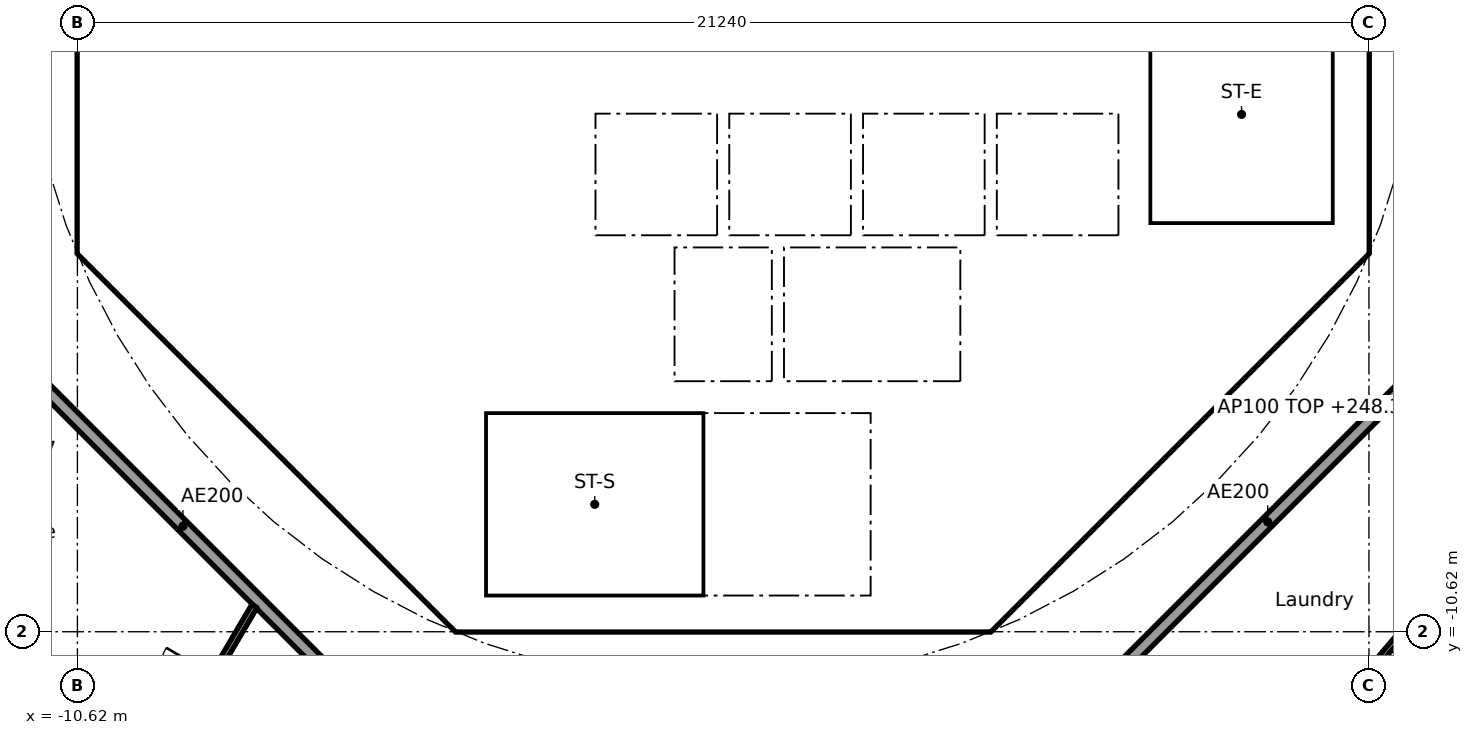
"""IFC4 building model, lengths in metres.
Left out: names, types, materials, properties, quantities, classifications, styles, units other than length and angle.
Written with IfcOpenShell. Run it as: python <this file> out.ifc"""

import sys

from ifc_helpers import new_model, si_unit, direction, frame, frame_2d, origin, place, context, subcontext, project, spatial, polyline, rectangle, outline, extrude, element, fill, save


model = new_model("IFC4")
c1 = context("Model", 3, precision=1e-05, world=origin(), true_north=direction((0.0, 1.0)))
c2 = subcontext(c1, "Body", "Model", "MODEL_VIEW")
j1 = project(units=[si_unit("LENGTHUNIT", "METRE"), si_unit("PLANEANGLEUNIT", "RADIAN")], contexts=[c1])
p1 = place(None, origin())
s1 = spatial("IfcSite", under=j1, at=p1, CompositionType="ELEMENT")
p2 = place(p1, origin())
s2 = spatial("IfcBuilding", under=s1, at=p2, CompositionType="ELEMENT")
p3 = place(p2, frame((0.0, 0.0, 245.5)))
s3 = spatial("IfcBuildingStorey", under=s2, at=p3, CompositionType="ELEMENT", Elevation=245.5)
p4 = place(p3, frame((-10.325, 3.801, 0.0), z_axis=(0.0, 0.0, 1.0), x_axis=(0.0, -1.0, 0.0)))
e1 = element("IfcWall", 1, at=p4, inside=s3, PredefinedType="SHEAR", context=c2, shape_type="SweptSolid", body=[
    extrude(rectangle(XDim=7.602, YDim=0.6, at=frame_2d((3.801, 0.0))), origin(), (0.0, 0.0, 1.0), 3.44),
])
p5 = place(p4, frame((0.651, 0.0, 0.0)))
e2 = element("IfcOpeningElement", 2, at=p5, cuts=e1, PredefinedType="OPENING", context=c2, shape_type="SweptSolid", body=[
    extrude(rectangle(XDim=1.5, YDim=2.1, at=frame_2d((0.75, 1.05))), frame((0.0, 0.31, 0.0), z_axis=(0.0, -1.0, 0.0), x_axis=(1.0, 0.0, 0.0)), (0.0, 0.0, 1.0), 0.62),
])
p6 = place(p4, frame((5.451, 0.0, 0.0)))
e3 = element("IfcOpeningElement", 3, at=p6, cuts=e1, PredefinedType="OPENING", context=c2, shape_type="SweptSolid", body=[
    extrude(rectangle(XDim=1.5, YDim=2.1, at=frame_2d((0.75, 1.05))), frame((0.0, 0.31, 0.0), z_axis=(0.0, -1.0, 0.0), x_axis=(1.0, 0.0, 0.0)), (0.0, 0.0, 1.0), 0.62),
])
p7 = place(p3, frame((-9.988, -4.613, 0.0), z_axis=(0.0, 0.0, 1.0), x_axis=(0.707106781187, -0.707106781187, 0.0)))
e4 = element("IfcWall", 4, at=p7, inside=s3, PredefinedType="SHEAR", context=c2, shape_type="SweptSolid", body=[
    extrude(rectangle(XDim=7.602, YDim=0.6, at=frame_2d((3.801, 0.0))), origin(), (0.0, 0.0, 1.0), 3.44),
])
p8 = place(p7, frame((6.151, 0.0, 0.0)))
e5 = element("IfcOpeningElement", 5, at=p8, cuts=e4, PredefinedType="OPENING", context=c2, shape_type="SweptSolid", body=[
    extrude(rectangle(XDim=1.1, YDim=2.1, at=frame_2d((0.55, 1.05))), frame((0.0, 0.31, 0.0), z_axis=(0.0, -1.0, 0.0), x_axis=(1.0, 0.0, 0.0)), (0.0, 0.0, 1.0), 0.62),
])
p9 = place(p3, frame((4.613, -9.988, 0.0), z_axis=(0.0, 0.0, 1.0), x_axis=(0.707106781187, 0.707106781187, 0.0)))
e6 = element("IfcWall", 6, at=p9, inside=s3, PredefinedType="SHEAR", context=c2, shape_type="SweptSolid", body=[
    extrude(rectangle(XDim=7.602, YDim=0.6, at=frame_2d((3.801, 0.0))), origin(), (0.0, 0.0, 1.0), 3.44),
])
p10 = place(p9, frame((3.201, 0.0, 0.0)))
e7 = element("IfcOpeningElement", 7, at=p10, cuts=e6, PredefinedType="OPENING", context=c2, shape_type="SweptSolid", body=[
    extrude(rectangle(XDim=1.2, YDim=2.1, at=frame_2d((0.6, 1.05))), frame((0.0, 0.31, 0.0), z_axis=(0.0, -1.0, 0.0), x_axis=(1.0, 0.0, 0.0)), (0.0, 0.0, 1.0), 0.62),
])
p11 = place(p3, frame((4.0, -10.025, 0.0), z_axis=(0.0, 0.0, 1.0), x_axis=(0.0, 1.0, 0.0)))
e8 = element("IfcWall", 8, at=p11, inside=s3, PredefinedType="SOLIDWALL", context=c2, shape_type="SweptSolid", body=[
    extrude(rectangle(XDim=3.0, YDim=0.2, at=frame_2d((1.5, 0.0))), origin(), (0.0, 0.0, 1.0), 3.44),
])
p12 = place(p11, frame((0.975, 0.0, 0.0)))
e9 = element("IfcOpeningElement", 9, at=p12, cuts=e8, PredefinedType="OPENING", context=c2, shape_type="SweptSolid", body=[
    extrude(rectangle(XDim=1.1, YDim=2.1, at=frame_2d((0.55, 1.05))), frame((0.0, 0.11, 0.0), z_axis=(0.0, -1.0, 0.0), x_axis=(1.0, 0.0, 0.0)), (0.0, 0.0, 1.0), 0.22),
])
p13 = place(p3, frame((-5.8, -8.227, 0.0), z_axis=(0.0, 0.0, 1.0), x_axis=(0.0, 1.0, 0.0)))
e10 = element("IfcWall", 10, at=p13, inside=s3, PredefinedType="PARTITIONING", context=c2, shape_type="SweptSolid", body=[
    extrude(rectangle(XDim=3.927, YDim=0.15, at=frame_2d((1.963, 0.0))), origin(), (0.0, 0.0, 1.0), 3.44),
])
p14 = place(p13, frame((2.615, 0.0, 0.0)))
e11 = element("IfcOpeningElement", 11, at=p14, cuts=e10, PredefinedType="OPENING", context=c2, shape_type="SweptSolid", body=[
    extrude(rectangle(XDim=0.9, YDim=2.1, at=frame_2d((0.45, 1.05))), frame((0.0, 0.085, 0.0), z_axis=(0.0, -1.0, 0.0), x_axis=(1.0, 0.0, 0.0)), (0.0, 0.0, 1.0), 0.17),
])
p15 = place(p13, frame((0.539, 0.0, 0.0)))
e12 = element("IfcOpeningElement", 12, at=p15, cuts=e10, PredefinedType="OPENING", context=c2, shape_type="SweptSolid", body=[
    extrude(rectangle(XDim=0.9, YDim=2.1, at=frame_2d((0.45, 1.05))), frame((0.0, 0.085, 0.0), z_axis=(0.0, -1.0, 0.0), x_axis=(1.0, 0.0, 0.0)), (0.0, 0.0, 1.0), 0.17),
])
p16 = place(p3, frame((4.0, -6.5, 0.0), z_axis=(0.0, 0.0, 1.0), x_axis=(0.0, 1.0, 0.0)))
e13 = element("IfcWall", 13, at=p16, inside=s3, PredefinedType="SOLIDWALL", context=c2, shape_type="SweptSolid", body=[
    extrude(rectangle(XDim=2.2, YDim=0.2, at=frame_2d((1.1, 0.0))), origin(), (0.0, 0.0, 1.0), 3.44),
])
p17 = place(p16, frame((0.55, 0.0, 0.0)))
e14 = element("IfcOpeningElement", 14, at=p17, cuts=e13, PredefinedType="OPENING", context=c2, shape_type="SweptSolid", body=[
    extrude(rectangle(XDim=1.1, YDim=2.1, at=frame_2d((0.55, 1.05))), frame((0.0, 0.11, 0.0), z_axis=(0.0, -1.0, 0.0), x_axis=(1.0, 0.0, 0.0)), (0.0, 0.0, 1.0), 0.22),
])
p18 = place(p3, frame((-4.0, -6.5, 0.0), z_axis=(0.0, 0.0, 1.0), x_axis=(0.0, 1.0, 0.0)))
e15 = element("IfcWall", 15, at=p18, inside=s3, PredefinedType="SOLIDWALL", context=c2, shape_type="SweptSolid", body=[
    extrude(rectangle(XDim=2.2, YDim=0.2, at=frame_2d((1.1, 0.0))), origin(), (0.0, 0.0, 1.0), 3.44),
])
p19 = place(p18, frame((0.65, 0.0, 0.0)))
e16 = element("IfcOpeningElement", 16, at=p19, cuts=e15, PredefinedType="OPENING", context=c2, shape_type="SweptSolid", body=[
    extrude(rectangle(XDim=0.9, YDim=2.1, at=frame_2d((0.45, 1.05))), frame((0.0, 0.11, 0.0), z_axis=(0.0, -1.0, 0.0), x_axis=(1.0, 0.0, 0.0)), (0.0, 0.0, 1.0), 0.22),
])
p20 = place(p3, frame((-6.7, -2.0, 0.0), z_axis=(0.0, 0.0, 1.0), x_axis=(1.0, 0.0, 0.0)))
e17 = element("IfcWall", 17, at=p20, inside=s3, PredefinedType="SOLIDWALL", context=c2, shape_type="SweptSolid", body=[
    extrude(rectangle(XDim=13.4, YDim=0.2, at=frame_2d((6.7, 0.0))), origin(), (0.0, 0.0, 1.0), 3.44),
])
p21 = place(p20, frame((5.05, 0.0, 0.0)))
e18 = element("IfcOpeningElement", 18, at=p21, cuts=e17, PredefinedType="OPENING", context=c2, shape_type="SweptSolid", body=[
    extrude(rectangle(XDim=1.1, YDim=2.1, at=frame_2d((0.55, 1.05))), frame((0.0, 0.11, 0.0), z_axis=(0.0, -1.0, 0.0), x_axis=(1.0, 0.0, 0.0)), (0.0, 0.0, 1.0), 0.22),
])
p22 = place(p20, frame((7.25, 0.0, 0.0)))
e19 = element("IfcOpeningElement", 19, at=p22, cuts=e17, PredefinedType="OPENING", context=c2, shape_type="SweptSolid", body=[
    extrude(rectangle(XDim=1.1, YDim=2.1, at=frame_2d((0.55, 1.05))), frame((0.0, 0.11, 0.0), z_axis=(0.0, -1.0, 0.0), x_axis=(1.0, 0.0, 0.0)), (0.0, 0.0, 1.0), 0.22),
])
p23 = place(p20, frame((1.85, 0.0, 0.0)))
e20 = element("IfcOpeningElement", 20, at=p23, cuts=e17, PredefinedType="OPENING", context=c2, shape_type="SweptSolid", body=[
    extrude(rectangle(XDim=0.9, YDim=2.1, at=frame_2d((0.45, 1.05))), frame((0.0, 0.11, 0.0), z_axis=(0.0, -1.0, 0.0), x_axis=(1.0, 0.0, 0.0)), (0.0, 0.0, 1.0), 0.22),
])
p24 = place(p3, origin())
e21 = element("IfcWall", 21, at=p24, inside=s3, PredefinedType="SHEAR", context=c2, shape_type="SweptSolid", body=[
    extrude(outline(polyline([(-10.625, -3.801), (-10.025, -3.801), (-10.025, -4.152), (-9.776, -4.401), (-10.2, -4.825), (-10.625, -4.401), (-10.625, -3.801)])), origin(), (0.0, 0.0, 1.0), 3.44),
])
p25 = place(p3, origin())
e22 = element("IfcWall", 22, at=p25, inside=s3, PredefinedType="SHEAR", context=c2, shape_type="SweptSolid", body=[
    extrude(outline(polyline([(-4.152, -10.025), (4.152, -10.025), (4.401, -9.776), (4.825, -10.2), (4.401, -10.625), (-4.401, -10.625), (-4.825, -10.2), (-4.401, -9.776), (-4.152, -10.025)])), origin(), (0.0, 0.0, 1.0), 3.44),
])
p26 = place(p3, origin())
e23 = element("IfcWall", 23, at=p26, inside=s3, PredefinedType="SHEAR", context=c2, shape_type="SweptSolid", body=[
    extrude(outline(polyline([(9.776, -4.401), (10.025, -4.152), (10.025, -3.801), (10.025, 4.152), (9.776, 4.401), (10.2, 4.825), (10.625, 4.401), (10.625, -4.401), (10.2, -4.825), (9.776, -4.401)])), origin(), (0.0, 0.0, 1.0), 3.44),
])
p27 = place(p3, frame((-10.025, -4.0, 0.0), z_axis=(0.0, 0.0, 1.0), x_axis=(1.0, 0.0, 0.0)))
e24 = element("IfcWall", 24, at=p27, inside=s3, PredefinedType="PARTITIONING", context=c2, shape_type="SweptSolid", body=[
    extrude(rectangle(XDim=3.325, YDim=0.2, at=frame_2d((1.662, 0.0))), origin(), (0.0, 0.0, 1.0), 3.44),
])
p28 = place(p3, frame((-8.001, -6.1, 0.0), z_axis=(0.0, 0.0, 1.0), x_axis=(1.0, 0.0, 0.0)))
e25 = element("IfcWall", 25, at=p28, inside=s3, PredefinedType="PARTITIONING", context=c2, shape_type="SweptSolid", body=[
    extrude(rectangle(XDim=2.126, YDim=0.15, at=frame_2d((1.063, 0.0))), origin(), (0.0, 0.0, 1.0), 3.44),
])
for number, where, z_axis, x_axis in (
    (26, (-0.9, -6.5, 0.0), (0.0, 0.0, 1.0), (0.0, 1.0, 0.0)),
    (27, (0.9, -6.5, 0.0), (0.0, 0.0, 1.0), (0.0, 1.0, 0.0)),
):
    element("IfcWall", number, at=place(p3, frame(where, z_axis=z_axis, x_axis=x_axis)), inside=s3, PredefinedType="SOLIDWALL", context=c2, shape_type="SweptSolid", body=[
        extrude(rectangle(XDim=2.2, YDim=0.2, at=frame_2d((1.1, 0.0))), origin(), (0.0, 0.0, 1.0), 3.44),
    ])
p29 = place(p3, origin())
e28 = element("IfcWall", 28, at=p29, inside=s3, PredefinedType="SOLIDWALL", context=c2, shape_type="SweptSolid", body=[
    extrude(outline(polyline([(-6.7, -2.1), (-6.5, -2.1), (-6.5, -4.1), (-2.3, -4.1), (-2.3, -2.1), (-2.1, -2.1), (-2.1, -4.1), (-0.1, -4.1), (-0.1, -2.1), (0.1, -2.1), (0.1, -4.1), (2.1, -4.1), (2.1, -2.1), (2.3, -2.1), (2.3, -4.1), (4.3, -4.1), (4.3, -2.1), (4.5, -2.1), (4.5, -4.1), (6.5, -4.1), (6.5, -2.1), (6.7, -2.1), (6.7, -4.3), (-6.7, -4.3), (-6.7, -2.1)])), origin(), (0.0, 0.0, 1.0), 3.44),
])
p30 = place(p3, origin())
e29 = element("IfcWall", 29, at=p30, inside=s3, PredefinedType="SOLIDWALL", context=c2, shape_type="SweptSolid", body=[
    extrude(outline(polyline([(-3.9, -10.025), (-4.1, -10.025), (-4.1, -7.025), (-3.9, -7.025), (-3.9, -10.025)])), origin(), (0.0, 0.0, 1.0), 3.44),
])
p31 = place(p3, origin())
e30 = element("IfcWall", 30, at=p31, inside=s3, PredefinedType="SOLIDWALL", context=c2, shape_type="SweptSolid", body=[
    extrude(outline(polyline([(4.1, -7.025), (-4.1, -7.025), (-4.1, -6.5), (4.1, -6.5), (4.1, -7.025)])), origin(), (0.0, 0.0, 1.0), 3.44),
])
p32 = place(p3, origin())
e31 = element("IfcWall", 31, at=p32, inside=s3, PredefinedType="SOLIDWALL", context=c2, shape_type="SweptSolid", body=[
    extrude(outline(polyline([(7.025, -3.9), (6.7, -3.9), (6.7, 3.9), (7.025, 3.9), (7.025, -3.9)])), origin(), (0.0, 0.0, 1.0), 3.44),
])
p33 = place(p3, origin())
e32 = element("IfcWall", 32, at=p33, inside=s3, PredefinedType="SOLIDWALL", context=c2, shape_type="SweptSolid", body=[
    extrude(outline(polyline([(10.025, -4.1), (6.7, -4.1), (6.7, -3.9), (10.025, -3.9), (10.025, -4.1)])), origin(), (0.0, 0.0, 1.0), 3.44),
])
p34 = place(p3, frame((-12.635, -5.134, 0.0), z_axis=(0.0, 0.0, 1.0), x_axis=(0.707106781187, -0.707106781187, 0.0)))
e33 = element("IfcWall", 33, at=p34, inside=s3, PredefinedType="PARTITIONING", context=c2, shape_type="SweptSolid", body=[
    extrude(rectangle(XDim=10.609, YDim=0.2, at=frame_2d((5.305, 0.0))), origin(), (0.0, 0.0, 1.0), 3.44),
])
p35 = place(p3, frame((5.275, -12.494, 0.0), z_axis=(0.0, 0.0, 1.0), x_axis=(0.707106781187, 0.707106781187, 0.0)))
e34 = element("IfcWall", 34, at=p35, inside=s3, PredefinedType="PARTITIONING", context=c2, shape_type="SweptSolid", body=[
    extrude(rectangle(XDim=10.409, YDim=0.2, at=frame_2d((5.205, 0.0))), origin(), (0.0, 0.0, 1.0), 3.44),
])
p36 = place(p3, frame((-12.688, -10.27, 0.0), z_axis=(0.0, 0.0, 1.0), x_axis=(0.728268142903, -0.685292282192, 0.0)))
e35 = element("IfcWall", 35, at=p36, inside=s3, PredefinedType="PARTITIONING", context=c2, shape_type="SweptSolid", body=[
    extrude(rectangle(XDim=4.312, YDim=0.1, at=frame_2d((2.156, 0.0))), origin(), (0.0, 0.0, 1.0), 2.837),
])
p37 = place(p3, frame((-7.709, -10.198, 0.0), z_axis=(0.0, 0.0, 1.0), x_axis=(-0.507355901053, -0.8617366127, 0.0)))
e36 = element("IfcWall", 36, at=p37, inside=s3, PredefinedType="PARTITIONING", context=c2, shape_type="SweptSolid", body=[
    extrude(rectangle(XDim=11.025, YDim=0.1, at=frame_2d((5.512, 0.0))), origin(), (0.0, 0.0, 1.0), 2.762),
])
p38 = place(p37, frame((5.05, 0.0, 0.0)))
e37 = element("IfcOpeningElement", 37, at=p38, cuts=e36, PredefinedType="OPENING", context=c2, shape_type="SweptSolid", body=[
    extrude(rectangle(XDim=0.9, YDim=2.1, at=frame_2d((0.45, 1.05))), frame((0.0, 0.06, 0.0), z_axis=(0.0, -1.0, 0.0), x_axis=(1.0, 0.0, 0.0)), (0.0, 0.0, 1.0), 0.12),
])
p39 = place(p37, frame((1.326, 0.0, 0.0)))
e38 = element("IfcOpeningElement", 38, at=p39, cuts=e36, PredefinedType="OPENING", context=c2, shape_type="SweptSolid", body=[
    extrude(rectangle(XDim=0.9, YDim=2.1, at=frame_2d((0.45, 1.05))), frame((0.0, 0.06, 0.0), z_axis=(0.0, -1.0, 0.0), x_axis=(1.0, 0.0, 0.0)), (0.0, 0.0, 1.0), 0.12),
])
p40 = place(p3, frame((10.753, -11.132, 0.0), z_axis=(0.0, 0.0, 1.0), x_axis=(0.64700741656, 0.762483706657, 0.0)))
e39 = element("IfcWall", 39, at=p40, inside=s3, PredefinedType="PARTITIONING", context=c2, shape_type="SweptSolid", body=[
    extrude(rectangle(XDim=6.459, YDim=0.1, at=frame_2d((3.229, 0.0))), origin(), (0.0, 0.0, 1.0), 2.837),
])
p41 = place(p40, frame((3.896, 0.0, 0.0)))
e40 = element("IfcOpeningElement", 40, at=p41, cuts=e39, PredefinedType="OPENING", context=c2, shape_type="SweptSolid", body=[
    extrude(rectangle(XDim=0.9, YDim=2.1, at=frame_2d((0.45, 1.05))), frame((0.0, 0.06, 0.0), z_axis=(0.0, -1.0, 0.0), x_axis=(1.0, 0.0, 0.0)), (0.0, 0.0, 1.0), 0.12),
])
p42 = place(p21, origin())
e41 = element("IfcDoor", 41, at=p42, inside=s3, OperationType="DOUBLE_DOOR_SLIDING", PredefinedType="DOOR", context=c2, shape_type="SweptSolid", body=[
    extrude(rectangle(XDim=1.1, YDim=2.1, at=frame_2d((0.55, 1.05))), frame((0.0, 0.025, 0.0), z_axis=(0.0, -1.0, 0.0), x_axis=(1.0, 0.0, 0.0)), (0.0, 0.0, 1.0), 0.05),
])
fill(e18, e41)
p43 = place(p22, origin())
e42 = element("IfcDoor", 42, at=p43, inside=s3, OperationType="DOUBLE_DOOR_SLIDING", PredefinedType="DOOR", context=c2, shape_type="SweptSolid", body=[
    extrude(rectangle(XDim=1.1, YDim=2.1, at=frame_2d((0.55, 1.05))), frame((0.0, 0.025, 0.0), z_axis=(0.0, -1.0, 0.0), x_axis=(1.0, 0.0, 0.0)), (0.0, 0.0, 1.0), 0.05),
])
fill(e19, e42)
p44 = place(p17, origin())
e43 = element("IfcDoor", 43, at=p44, inside=s3, OperationType="DOUBLE_DOOR_SLIDING", PredefinedType="DOOR", context=c2, shape_type="SweptSolid", body=[
    extrude(rectangle(XDim=1.1, YDim=2.1, at=frame_2d((0.55, 1.05))), frame((0.0, 0.025, 0.0), z_axis=(0.0, -1.0, 0.0), x_axis=(1.0, 0.0, 0.0)), (0.0, 0.0, 1.0), 0.05),
])
fill(e14, e43)
p45 = place(p12, origin())
e44 = element("IfcDoor", 44, at=p45, inside=s3, OperationType="SINGLE_SWING_LEFT", PredefinedType="DOOR", context=c2, shape_type="SweptSolid", body=[
    extrude(rectangle(XDim=1.1, YDim=2.1, at=frame_2d((0.55, 1.05))), frame((0.0, 0.025, 0.0), z_axis=(0.0, -1.0, 0.0), x_axis=(1.0, 0.0, 0.0)), (0.0, 0.0, 1.0), 0.05),
])
fill(e9, e44)
p46 = place(p14, origin())
e45 = element("IfcDoor", 45, at=p46, inside=s3, OperationType="SINGLE_SWING_LEFT", PredefinedType="DOOR", context=c2, shape_type="SweptSolid", body=[
    extrude(rectangle(XDim=0.9, YDim=2.1, at=frame_2d((0.45, 1.05))), frame((0.0, 0.025, 0.0), z_axis=(0.0, -1.0, 0.0), x_axis=(1.0, 0.0, 0.0)), (0.0, 0.0, 1.0), 0.05),
])
fill(e11, e45)
p47 = place(p15, origin())
e46 = element("IfcDoor", 46, at=p47, inside=s3, OperationType="SINGLE_SWING_LEFT", PredefinedType="DOOR", context=c2, shape_type="SweptSolid", body=[
    extrude(rectangle(XDim=0.9, YDim=2.1, at=frame_2d((0.45, 1.05))), frame((0.0, 0.025, 0.0), z_axis=(0.0, -1.0, 0.0), x_axis=(1.0, 0.0, 0.0)), (0.0, 0.0, 1.0), 0.05),
])
fill(e12, e46)
p48 = place(p19, frame((0.9, 0.0, 0.0), x_axis=(-1.0, 0.0, 0.0)))
e47 = element("IfcDoor", 47, at=p48, inside=s3, OperationType="SINGLE_SWING_LEFT", PredefinedType="DOOR", context=c2, shape_type="SweptSolid", body=[
    extrude(rectangle(XDim=0.9, YDim=2.1, at=frame_2d((0.45, 1.05))), frame((0.0, 0.025, 0.0), z_axis=(0.0, -1.0, 0.0), x_axis=(1.0, 0.0, 0.0)), (0.0, 0.0, 1.0), 0.05),
])
fill(e16, e47)
p49 = place(p23, frame((0.9, 0.0, 0.0), x_axis=(-1.0, 0.0, 0.0)))
e48 = element("IfcDoor", 48, at=p49, inside=s3, OperationType="SINGLE_SWING_LEFT", PredefinedType="DOOR", context=c2, shape_type="SweptSolid", body=[
    extrude(rectangle(XDim=0.9, YDim=2.1, at=frame_2d((0.45, 1.05))), frame((0.0, 0.025, 0.0), z_axis=(0.0, -1.0, 0.0), x_axis=(1.0, 0.0, 0.0)), (0.0, 0.0, 1.0), 0.05),
])
fill(e20, e48)
p50 = place(p10, origin())
e49 = element("IfcDoor", 49, at=p50, inside=s3, OperationType="SINGLE_SWING_RIGHT", PredefinedType="DOOR", context=c2, shape_type="SweptSolid", body=[
    extrude(rectangle(XDim=1.2, YDim=2.1, at=frame_2d((0.6, 1.05))), frame((0.0, 0.025, 0.0), z_axis=(0.0, -1.0, 0.0), x_axis=(1.0, 0.0, 0.0)), (0.0, 0.0, 1.0), 0.05),
])
fill(e7, e49)
p51 = place(p6, origin())
e50 = element("IfcDoor", 50, at=p51, inside=s3, OperationType="DOUBLE_DOOR_SINGLE_SWING", PredefinedType="DOOR", context=c2, shape_type="SweptSolid", body=[
    extrude(rectangle(XDim=1.5, YDim=2.1, at=frame_2d((0.75, 1.05))), frame((0.0, 0.025, 0.0), z_axis=(0.0, -1.0, 0.0), x_axis=(1.0, 0.0, 0.0)), (0.0, 0.0, 1.0), 0.05),
])
fill(e3, e50)
p52 = place(p8, origin())
e51 = element("IfcDoor", 51, at=p52, inside=s3, OperationType="SINGLE_SWING_RIGHT", PredefinedType="DOOR", context=c2, shape_type="SweptSolid", body=[
    extrude(rectangle(XDim=1.1, YDim=2.1, at=frame_2d((0.55, 1.05))), frame((0.0, 0.025, 0.0), z_axis=(0.0, -1.0, 0.0), x_axis=(1.0, 0.0, 0.0)), (0.0, 0.0, 1.0), 0.05),
])
fill(e5, e51)
save(model, sys.argv[1])
